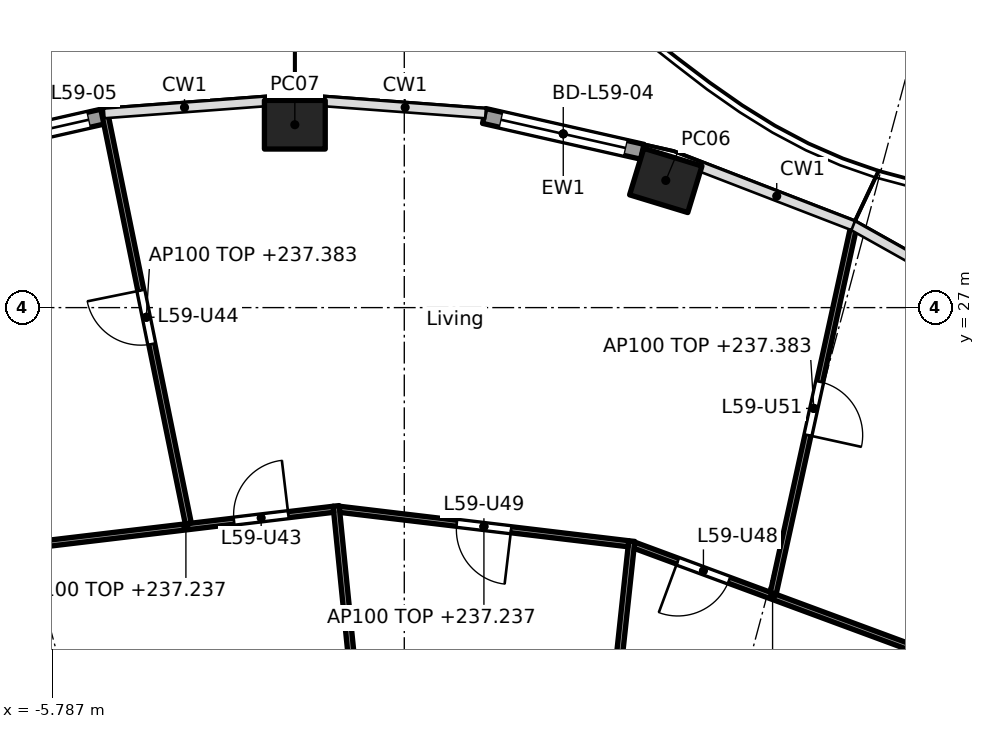
"""IFC4 building model, lengths in metres.
Left out: names, types, materials, properties, quantities, classifications, styles, units other than length and angle.
Written with IfcOpenShell. Run it as: python <this file> out.ifc"""

import sys

from ifc_helpers import new_model, si_unit, direction, frame, frame_2d, origin, origin_2d, place, context, subcontext, project, spatial, rectangle, hollow_rectangle, extrude, element, fill, save


model = new_model("IFC4")
c1 = context("Model", 3, precision=1e-05, world=origin(), true_north=direction((0.0, 1.0)))
c2 = subcontext(c1, "Body", "Model", "MODEL_VIEW")
j1 = project(units=[si_unit("LENGTHUNIT", "METRE"), si_unit("PLANEANGLEUNIT", "RADIAN")], contexts=[c1])
p1 = place(None, origin())
s1 = spatial("IfcSite", under=j1, at=p1, CompositionType="ELEMENT")
p2 = place(p1, origin())
s2 = spatial("IfcBuilding", under=s1, at=p2, CompositionType="ELEMENT")
p3 = place(p2, frame((0.0, 0.0, 234.4)))
s3 = spatial("IfcBuildingStorey", under=s2, at=p3, CompositionType="ELEMENT", Elevation=234.4)
for number, where, z_axis, x_axis in (
    (1, (4.3, 29.092, 0.0), (0.0, 0.0, 1.0), (-0.957, 0.292, 0.0)),
    (2, (-1.8, 30.008, 0.0), (0.0, 0.0, 1.0), (-1.0, 0.0, 0.0)),
):
    element("IfcColumn", number, at=place(p3, frame(where, z_axis=z_axis, x_axis=x_axis)), inside=s3, PredefinedType="COLUMN", context=c2, shape_type="SweptSolid", body=[
        extrude(hollow_rectangle(XDim=1.0, YDim=0.8, WallThickness=0.032, at=origin_2d()), origin(), (0.0, 0.0, 1.0), 3.7),
    ])
p4 = place(p3, frame((1.314, 30.151, 0.0), z_axis=(0.0, 0.0, 1.0), x_axis=(0.975324089124, -0.220777990694, 0.0)))
e3 = element("IfcWall", 3, at=p4, inside=s3, PredefinedType="SOLIDWALL", context=c2, shape_type="SweptSolid", body=[
    extrude(rectangle(XDim=2.666, YDim=0.25, at=frame_2d((1.333, 0.0))), origin(), (0.0, 0.0, 1.0), 3.44),
])
p5 = place(p4, frame((0.283, 0.0, 0.0)))
e4 = element("IfcOpeningElement", 4, at=p5, cuts=e3, PredefinedType="OPENING", context=c2, shape_type="SweptSolid", body=[
    extrude(rectangle(XDim=2.1, YDim=2.4, at=frame_2d((1.05, 1.2))), frame((0.0, 0.135, 0.0), z_axis=(0.0, -1.0, 0.0), x_axis=(1.0, 0.0, 0.0)), (0.0, 0.0, 1.0), 0.27),
])
p6 = place(p3, frame((-7.514, 29.563, 0.0), z_axis=(0.0, 0.0, 1.0), x_axis=(0.975324089124, 0.220777990694, 0.0)))
e5 = element("IfcWall", 5, at=p6, inside=s3, PredefinedType="SOLIDWALL", context=c2, shape_type="SweptSolid", body=[
    extrude(rectangle(XDim=2.666, YDim=0.25, at=frame_2d((1.333, 0.0))), origin(), (0.0, 0.0, 1.0), 3.44),
])
p7 = place(p6, frame((0.283, 0.0, 0.0)))
e6 = element("IfcOpeningElement", 6, at=p7, cuts=e5, PredefinedType="OPENING", context=c2, shape_type="SweptSolid", body=[
    extrude(rectangle(XDim=2.1, YDim=2.4, at=frame_2d((1.05, 1.2))), frame((0.0, 0.135, 0.0), z_axis=(0.0, -1.0, 0.0), x_axis=(1.0, 0.0, 0.0)), (0.0, 0.0, 1.0), 0.27),
])
p8 = place(p3, frame((8.331, 21.411, 0.0), z_axis=(0.0, 0.0, 1.0), x_axis=(-0.937891982431, 0.346927412136, 0.0)))
e7 = element("IfcWall", 7, at=p8, inside=s3, PredefinedType="PARTITIONING", context=c2, shape_type="SweptSolid", body=[
    extrude(rectangle(XDim=4.85, YDim=0.1, at=frame_2d((2.425, 0.0))), origin(), (0.0, 0.0, 1.0), 2.837),
])
p9 = place(p8, frame((3.188, 0.0, 0.0)))
e8 = element("IfcOpeningElement", 8, at=p9, cuts=e7, PredefinedType="OPENING", context=c2, shape_type="SweptSolid", body=[
    extrude(rectangle(XDim=0.9, YDim=2.1, at=frame_2d((0.45, 1.05))), frame((0.0, 0.06, 0.0), z_axis=(0.0, -1.0, 0.0), x_axis=(1.0, 0.0, 0.0)), (0.0, 0.0, 1.0), 0.12),
])
p10 = place(p3, frame((6.067, 22.301, 0.0), z_axis=(0.0, 0.0, 1.0), x_axis=(0.214401821533, 0.976745544614, 0.0)))
e9 = element("IfcWall", 9, at=p10, inside=s3, PredefinedType="PARTITIONING", context=c2, shape_type="SweptSolid", body=[
    extrude(rectangle(XDim=6.228, YDim=0.1, at=frame_2d((3.114, 0.0))), origin(), (0.0, 0.0, 1.0), 2.983),
])
p11 = place(p10, frame((2.664, 0.0, 0.0)))
e10 = element("IfcOpeningElement", 10, at=p11, cuts=e9, PredefinedType="OPENING", context=c2, shape_type="SweptSolid", body=[
    extrude(rectangle(XDim=0.9, YDim=2.1, at=frame_2d((0.45, 1.05))), frame((0.0, 0.06, 0.0), z_axis=(0.0, -1.0, 0.0), x_axis=(1.0, 0.0, 0.0)), (0.0, 0.0, 1.0), 0.12),
])
p12 = place(p3, frame((3.145, 17.618, 0.0), z_axis=(0.0, 0.0, 1.0), x_axis=(0.106820754108, 0.994278294288, 0.0)))
e11 = element("IfcWall", 11, at=p12, inside=s3, PredefinedType="PARTITIONING", context=c2, shape_type="SweptSolid", body=[
    extrude(rectangle(XDim=5.574, YDim=0.1, at=frame_2d((2.787, 0.0))), origin(), (0.0, 0.0, 1.0), 3.44),
])
p13 = place(p3, frame((3.686, 23.117, 0.0), z_axis=(0.0, 0.0, 1.0), x_axis=(-0.992965872314, 0.11840091393, 0.0)))
e12 = element("IfcWall", 12, at=p13, inside=s3, PredefinedType="PARTITIONING", context=c2, shape_type="SweptSolid", body=[
    extrude(rectangle(XDim=4.786, YDim=0.1, at=frame_2d((2.393, 0.0))), origin(), (0.0, 0.0, 1.0), 2.837),
])
p14 = place(p13, frame((1.943, 0.0, 0.0)))
e13 = element("IfcOpeningElement", 13, at=p14, cuts=e12, PredefinedType="OPENING", context=c2, shape_type="SweptSolid", body=[
    extrude(rectangle(XDim=0.9, YDim=2.1, at=frame_2d((0.45, 1.05))), frame((0.0, 0.06, 0.0), z_axis=(0.0, -1.0, 0.0), x_axis=(1.0, 0.0, 0.0)), (0.0, 0.0, 1.0), 0.12),
])
p15 = place(p3, frame((-0.535, 17.898, 0.0), z_axis=(0.0, 0.0, 1.0), x_axis=(-0.099853714131, 0.995002128527, 0.0)))
e14 = element("IfcWall", 14, at=p15, inside=s3, PredefinedType="PARTITIONING", context=c2, shape_type="SweptSolid", body=[
    extrude(rectangle(XDim=5.87, YDim=0.1, at=frame_2d((2.935, 0.0))), origin(), (0.0, 0.0, 1.0), 3.44),
])
p16 = place(p3, frame((-1.166, 23.683, 0.0), z_axis=(0.0, 0.0, 1.0), x_axis=(-0.992961712415, -0.118435795593, 0.0)))
e15 = element("IfcWall", 15, at=p16, inside=s3, PredefinedType="PARTITIONING", context=c2, shape_type="SweptSolid", body=[
    extrude(rectangle(XDim=4.885, YDim=0.1, at=frame_2d((2.443, 0.0))), origin(), (0.0, 0.0, 1.0), 2.837),
])
p17 = place(p16, frame((0.746, 0.0, 0.0)))
e16 = element("IfcOpeningElement", 16, at=p17, cuts=e15, PredefinedType="OPENING", context=c2, shape_type="SweptSolid", body=[
    extrude(rectangle(XDim=0.9, YDim=2.1, at=frame_2d((0.45, 1.05))), frame((0.0, 0.06, 0.0), z_axis=(0.0, -1.0, 0.0), x_axis=(1.0, 0.0, 0.0)), (0.0, 0.0, 1.0), 0.12),
])
p18 = place(p3, frame((-3.552, 23.449, 0.0), z_axis=(0.0, 0.0, 1.0), x_axis=(-0.199593197846, 0.979878847294, 0.0)))
e17 = element("IfcWall", 17, at=p18, inside=s3, PredefinedType="PARTITIONING", context=c2, shape_type="SweptSolid", body=[
    extrude(rectangle(XDim=6.925, YDim=0.1, at=frame_2d((3.462, 0.0))), origin(), (0.0, 0.0, 1.0), 2.983),
])
p19 = place(p18, frame((3.012, 0.0, 0.0)))
e18 = element("IfcOpeningElement", 18, at=p19, cuts=e17, PredefinedType="OPENING", context=c2, shape_type="SweptSolid", body=[
    extrude(rectangle(XDim=0.9, YDim=2.1, at=frame_2d((0.45, 1.05))), frame((0.0, 0.06, 0.0), z_axis=(0.0, -1.0, 0.0), x_axis=(1.0, 0.0, 0.0)), (0.0, 0.0, 1.0), 0.12),
])
p20 = place(p5, origin())
e19 = element("IfcDoor", 19, at=p20, inside=s3, OperationType="SLIDING_TO_LEFT", PredefinedType="DOOR", context=c2, shape_type="SweptSolid", body=[
    extrude(rectangle(XDim=2.1, YDim=2.4, at=frame_2d((1.05, 1.2))), frame((0.0, 0.025, 0.0), z_axis=(0.0, -1.0, 0.0), x_axis=(1.0, 0.0, 0.0)), (0.0, 0.0, 1.0), 0.05),
])
fill(e4, e19)
p21 = place(p7, origin())
e20 = element("IfcDoor", 20, at=p21, inside=s3, OperationType="SLIDING_TO_LEFT", PredefinedType="DOOR", context=c2, shape_type="SweptSolid", body=[
    extrude(rectangle(XDim=2.1, YDim=2.4, at=frame_2d((1.05, 1.2))), frame((0.0, 0.025, 0.0), z_axis=(0.0, -1.0, 0.0), x_axis=(1.0, 0.0, 0.0)), (0.0, 0.0, 1.0), 0.05),
])
fill(e6, e20)
p22 = place(p17, frame((0.9, 0.0, 0.0), x_axis=(-1.0, 0.0, 0.0)))
e21 = element("IfcDoor", 21, at=p22, inside=s3, OperationType="SINGLE_SWING_RIGHT", PredefinedType="DOOR", context=c2, shape_type="SweptSolid", body=[
    extrude(rectangle(XDim=0.9, YDim=2.1, at=frame_2d((0.45, 1.05))), frame((0.0, 0.025, 0.0), z_axis=(0.0, -1.0, 0.0), x_axis=(1.0, 0.0, 0.0)), (0.0, 0.0, 1.0), 0.05),
])
fill(e16, e21)
p23 = place(p19, origin())
e22 = element("IfcDoor", 22, at=p23, inside=s3, OperationType="SINGLE_SWING_RIGHT", PredefinedType="DOOR", context=c2, shape_type="SweptSolid", body=[
    extrude(rectangle(XDim=0.9, YDim=2.1, at=frame_2d((0.45, 1.05))), frame((0.0, 0.025, 0.0), z_axis=(0.0, -1.0, 0.0), x_axis=(1.0, 0.0, 0.0)), (0.0, 0.0, 1.0), 0.05),
])
fill(e18, e22)
p24 = place(p9, origin())
e23 = element("IfcDoor", 23, at=p24, inside=s3, OperationType="SINGLE_SWING_RIGHT", PredefinedType="DOOR", context=c2, shape_type="SweptSolid", body=[
    extrude(rectangle(XDim=0.9, YDim=2.1, at=frame_2d((0.45, 1.05))), frame((0.0, 0.025, 0.0), z_axis=(0.0, -1.0, 0.0), x_axis=(1.0, 0.0, 0.0)), (0.0, 0.0, 1.0), 0.05),
])
fill(e8, e23)
p25 = place(p14, origin())
e24 = element("IfcDoor", 24, at=p25, inside=s3, OperationType="SINGLE_SWING_LEFT", PredefinedType="DOOR", context=c2, shape_type="SweptSolid", body=[
    extrude(rectangle(XDim=0.9, YDim=2.1, at=frame_2d((0.45, 1.05))), frame((0.0, 0.025, 0.0), z_axis=(0.0, -1.0, 0.0), x_axis=(1.0, 0.0, 0.0)), (0.0, 0.0, 1.0), 0.05),
])
fill(e13, e24)
p26 = place(p11, frame((0.9, 0.0, 0.0), x_axis=(-1.0, 0.0, 0.0)))
e25 = element("IfcDoor", 25, at=p26, inside=s3, OperationType="SINGLE_SWING_RIGHT", PredefinedType="DOOR", context=c2, shape_type="SweptSolid", body=[
    extrude(rectangle(XDim=0.9, YDim=2.1, at=frame_2d((0.45, 1.05))), frame((0.0, 0.025, 0.0), z_axis=(0.0, -1.0, 0.0), x_axis=(1.0, 0.0, 0.0)), (0.0, 0.0, 1.0), 0.05),
])
fill(e10, e25)
save(model, sys.argv[1])
